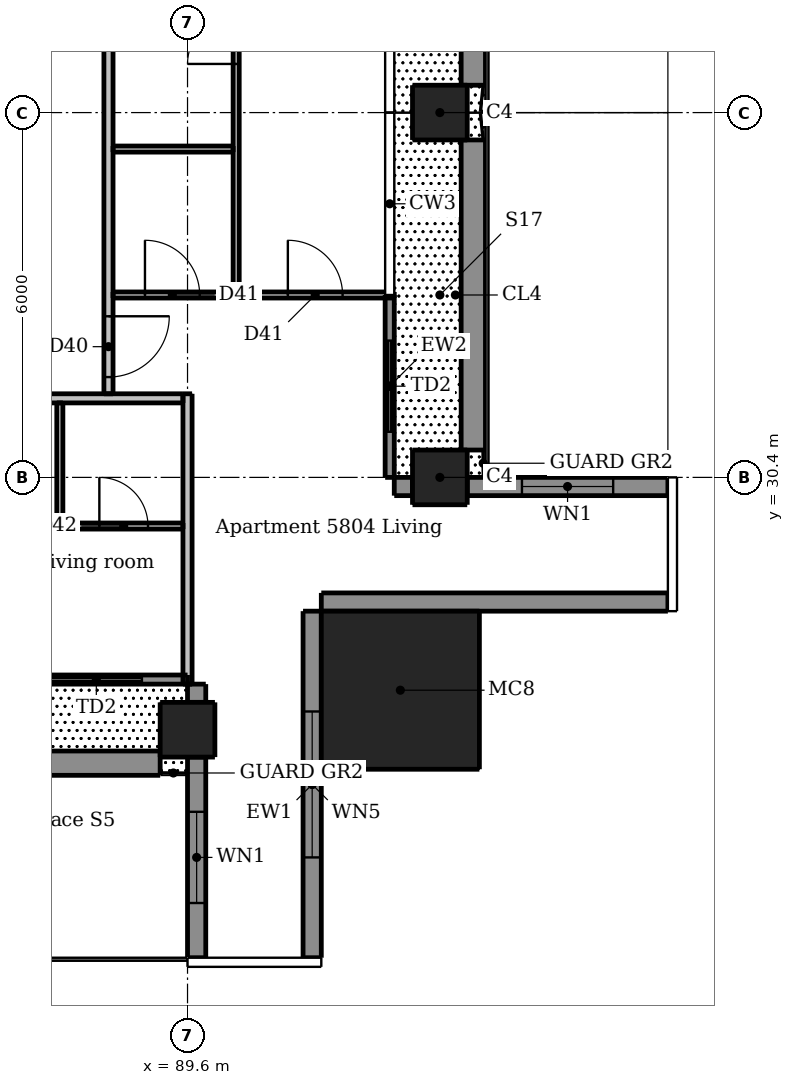
"""IFC4 building model, lengths in metres.
Left out: names, types, materials, properties, quantities, classifications, styles, units other than length and angle.
Written with IfcOpenShell. Run it as: python <this file> out.ifc"""

import sys

from ifc_helpers import new_model, si_unit, direction, frame, frame_2d, origin, origin_2d, place, context, subcontext, project, spatial, rectangle, extrude, element, fill, save


model = new_model("IFC4")
c1 = context("Model", 3, precision=1e-05, world=origin(), true_north=direction((0.0, 1.0)))
c2 = subcontext(c1, "Body", "Model", "MODEL_VIEW")
j1 = project(units=[si_unit("LENGTHUNIT", "METRE"), si_unit("PLANEANGLEUNIT", "RADIAN")], contexts=[c1])
p1 = place(None, origin())
s1 = spatial("IfcSite", under=j1, at=p1, CompositionType="ELEMENT")
p2 = place(p1, origin())
s2 = spatial("IfcBuilding", under=s1, at=p2, CompositionType="ELEMENT")
p3 = place(p2, frame((0.0, 0.0, 216.7)))
s3 = spatial("IfcBuildingStorey", under=s2, at=p3, CompositionType="ELEMENT", Elevation=216.7)
for number, where, z_axis, x_axis in (
    (1, (89.6, 26.25, 0.0), (0.0, 0.0, 1.0), (1.0, 0.0, 0.0)),
    (2, (93.75, 30.4, 0.0), (0.0, 0.0, 1.0), (1.0, 0.0, 0.0)),
):
    element("IfcColumn", number, at=place(p3, frame(where, z_axis=z_axis, x_axis=x_axis)), inside=s3, PredefinedType="COLUMN", context=c2, shape_type="SweptSolid", body=[
        extrude(rectangle(XDim=0.9, YDim=0.9, at=origin_2d()), origin(), (0.0, 0.0, 1.0), 3.05),
    ])
p4 = place(p3, frame((93.75, 36.4, 0.0), z_axis=(0.0, 0.0, 1.0), x_axis=(1.0, 0.0, 0.0)))
e3 = element("IfcColumn", 3, at=p4, inside=s3, PredefinedType="COLUMN", context=c2, shape_type="SweptSolid", body=[
    extrude(rectangle(XDim=0.9, YDim=0.9, at=origin_2d()), origin(), (0.0, 0.0, 1.0), 3.3),
])
p5 = place(p3, frame((93.1, 26.9, 0.0), z_axis=(0.0, 0.0, 1.0), x_axis=(1.0, 0.0, 0.0)))
e4 = element("IfcColumn", 4, at=p5, inside=s3, PredefinedType="COLUMN", context=c2, shape_type="SweptSolid", body=[
    extrude(rectangle(XDim=2.6, YDim=2.6, at=origin_2d()), origin(), (0.0, 0.0, 1.0), 3.3),
])
p6 = place(p3, frame((89.75, 27.0, 0.0), z_axis=(0.0, 0.0, 1.0), x_axis=(0.0, -1.0, 0.0)))
e5 = element("IfcWall", 5, at=p6, inside=s3, PredefinedType="SOLIDWALL", context=c2, shape_type="SweptSolid", body=[
    extrude(rectangle(XDim=0.3, YDim=0.3, at=frame_2d((0.15, 0.0))), origin(), (0.0, 0.0, 1.0), 3.05),
])
p7 = place(p3, frame((89.75, 25.8, 0.0), z_axis=(0.0, 0.0, 1.0), x_axis=(0.0, -1.0, 0.0)))
e6 = element("IfcWall", 6, at=p7, inside=s3, PredefinedType="SOLIDWALL", context=c2, shape_type="SweptSolid", body=[
    extrude(rectangle(XDim=3.3, YDim=0.3, at=frame_2d((1.65, 0.0))), origin(), (0.0, 0.0, 1.0), 3.05),
])
p8 = place(p7, frame((0.9, 0.0, 0.9)))
e7 = element("IfcOpeningElement", 7, at=p8, cuts=e6, PredefinedType="OPENING", context=c2, shape_type="SweptSolid", body=[
    extrude(rectangle(XDim=1.5, YDim=1.5, at=frame_2d((0.75, 0.75))), frame((0.0, 0.16, 0.0), z_axis=(0.0, -1.0, 0.0), x_axis=(1.0, 0.0, 0.0)), (0.0, 0.0, 1.0), 0.32),
])
p9 = place(p3, frame((91.65, 22.5, 0.0), z_axis=(0.0, 0.0, 1.0), x_axis=(0.0, 1.0, 0.0)))
e8 = element("IfcWall", 8, at=p9, inside=s3, PredefinedType="SOLIDWALL", context=c2, shape_type="SweptSolid", body=[
    extrude(rectangle(XDim=5.7, YDim=0.3, at=frame_2d((2.85, 0.0))), origin(), (0.0, 0.0, 1.0), 3.05),
])
p10 = place(p9, frame((1.65, 0.0, 0.15)))
e9 = element("IfcOpeningElement", 9, at=p10, cuts=e8, PredefinedType="OPENING", context=c2, shape_type="SweptSolid", body=[
    extrude(rectangle(XDim=2.4, YDim=2.1, at=frame_2d((1.2, 1.05))), frame((0.0, 0.16, 0.0), z_axis=(0.0, -1.0, 0.0), x_axis=(1.0, 0.0, 0.0)), (0.0, 0.0, 1.0), 0.32),
])
p11 = place(p3, frame((91.8, 28.35, 0.0), z_axis=(0.0, 0.0, 1.0), x_axis=(1.0, 0.0, 0.0)))
e10 = element("IfcWall", 10, at=p11, inside=s3, PredefinedType="SOLIDWALL", context=c2, shape_type="SweptSolid", body=[
    extrude(rectangle(XDim=5.7, YDim=0.3, at=frame_2d((2.85, 0.0))), origin(), (0.0, 0.0, 1.0), 3.05),
])
p12 = place(p3, frame((97.5, 30.25, 0.0), z_axis=(0.0, 0.0, 1.0), x_axis=(-1.0, 0.0, 0.0)))
e11 = element("IfcWall", 11, at=p12, inside=s3, PredefinedType="SOLIDWALL", context=c2, shape_type="SweptSolid", body=[
    extrude(rectangle(XDim=3.3, YDim=0.3, at=frame_2d((1.65, 0.0))), origin(), (0.0, 0.0, 1.0), 3.05),
])
p13 = place(p12, frame((0.9, 0.0, 0.9)))
e12 = element("IfcOpeningElement", 12, at=p13, cuts=e11, PredefinedType="OPENING", context=c2, shape_type="SweptSolid", body=[
    extrude(rectangle(XDim=1.5, YDim=1.5, at=frame_2d((0.75, 0.75))), frame((0.0, 0.16, 0.0), z_axis=(0.0, -1.0, 0.0), x_axis=(1.0, 0.0, 0.0)), (0.0, 0.0, 1.0), 0.32),
])
p14 = place(p3, frame((93.3, 30.25, 0.0), z_axis=(0.0, 0.0, 1.0), x_axis=(-1.0, 0.0, 0.0)))
e13 = element("IfcWall", 13, at=p14, inside=s3, PredefinedType="SOLIDWALL", context=c2, shape_type="SweptSolid", body=[
    extrude(rectangle(XDim=0.3, YDim=0.3, at=frame_2d((0.15, 0.0))), origin(), (0.0, 0.0, 1.0), 3.05),
])
p15 = place(p3, frame((86.6, 27.075, 0.0), z_axis=(0.0, 0.0, 1.0), x_axis=(1.0, 0.0, 0.0)))
e14 = element("IfcWall", 14, at=p15, inside=s3, PredefinedType="SOLIDWALL", context=c2, shape_type="SweptSolid", body=[
    extrude(rectangle(XDim=3.0, YDim=0.15, at=frame_2d((1.5, 0.0))), origin(), (0.0, 0.0, 1.0), 3.05),
])
p16 = place(p15, frame((0.75, 0.0, 0.0)))
e15 = element("IfcOpeningElement", 15, at=p16, cuts=e14, PredefinedType="OPENING", context=c2, shape_type="SweptSolid", body=[
    extrude(rectangle(XDim=1.5, YDim=2.4, at=frame_2d((0.75, 1.2))), frame((0.0, 0.085, 0.0), z_axis=(0.0, -1.0, 0.0), x_axis=(1.0, 0.0, 0.0)), (0.0, 0.0, 1.0), 0.17),
])
p17 = place(p3, frame((92.925, 30.4, 0.0), z_axis=(0.0, 0.0, 1.0), x_axis=(0.0, 1.0, 0.0)))
e16 = element("IfcWall", 16, at=p17, inside=s3, PredefinedType="SOLIDWALL", context=c2, shape_type="SweptSolid", body=[
    extrude(rectangle(XDim=3.0, YDim=0.15, at=frame_2d((1.5, 0.0))), origin(), (0.0, 0.0, 1.0), 3.05),
])
p18 = place(p17, frame((0.75, 0.0, 0.0)))
e17 = element("IfcOpeningElement", 17, at=p18, cuts=e16, PredefinedType="OPENING", context=c2, shape_type="SweptSolid", body=[
    extrude(rectangle(XDim=1.5, YDim=2.4, at=frame_2d((0.75, 1.2))), frame((0.0, 0.085, 0.0), z_axis=(0.0, -1.0, 0.0), x_axis=(1.0, 0.0, 0.0)), (0.0, 0.0, 1.0), 0.17),
])
for number, where, z_axis, x_axis in (
    (18, (84.05, 25.7, 0.03), (0.0, 0.0, 1.0), (1.0, 0.0, 0.0)),
    (19, (94.3, 30.85, 0.03), (0.0, 0.0, 1.0), (0.0, 1.0, 0.0)),
):
    element("IfcWall", number, at=place(p3, frame(where, z_axis=z_axis, x_axis=x_axis)), inside=s3, PredefinedType="PARAPET", context=c2, shape_type="SweptSolid", body=[
        extrude(rectangle(XDim=5.1, YDim=0.4, at=frame_2d((2.55, 0.0))), origin(), (0.0, 0.0, 1.0), 1.1),
    ])
p19 = place(p3, frame((94.3, 36.85, 0.03), z_axis=(0.0, 0.0, 1.0), x_axis=(0.0, 1.0, 0.0)))
e20 = element("IfcWall", 20, at=p19, inside=s3, PredefinedType="PARAPET", context=c2, shape_type="SweptSolid", body=[
    extrude(rectangle(XDim=5.55, YDim=0.4, at=frame_2d((2.775, 0.0))), origin(), (0.0, 0.0, 1.0), 1.1),
])
p20 = place(p3, frame((87.5, 29.55, 0.0), z_axis=(0.0, 0.0, 1.0), x_axis=(0.0, 1.0, 0.0)))
e21 = element("IfcWall", 21, at=p20, inside=s3, PredefinedType="PARTITIONING", context=c2, shape_type="SweptSolid", body=[
    extrude(rectangle(XDim=2.075, YDim=0.1, at=frame_2d((1.038, 0.0))), origin(), (0.0, 0.0, 1.0), 3.05),
])
p21 = place(p3, frame((90.4, 33.45, 0.0), z_axis=(0.0, 0.0, 1.0), x_axis=(0.0, 1.0, 0.0)))
e22 = element("IfcWall", 22, at=p21, inside=s3, PredefinedType="PARTITIONING", context=c2, shape_type="SweptSolid", body=[
    extrude(rectangle(XDim=9.0, YDim=0.1, at=frame_2d((4.5, 0.0))), origin(), (0.0, 0.0, 1.0), 3.05),
])
p22 = place(p21, frame((3.75, 0.0, 0.0)))
e23 = element("IfcOpeningElement", 23, at=p22, cuts=e22, PredefinedType="OPENING", context=c2, shape_type="SweptSolid", body=[
    extrude(rectangle(XDim=0.8, YDim=2.1, at=frame_2d((0.4, 1.05))), frame((0.0, 0.06, 0.0), z_axis=(0.0, -1.0, 0.0), x_axis=(1.0, 0.0, 0.0)), (0.0, 0.0, 1.0), 0.12),
])
p23 = place(p21, frame((7.0, 0.0, 0.0)))
e24 = element("IfcOpeningElement", 24, at=p23, cuts=e22, PredefinedType="OPENING", context=c2, shape_type="SweptSolid", body=[
    extrude(rectangle(XDim=0.9, YDim=2.1, at=frame_2d((0.45, 1.05))), frame((0.0, 0.06, 0.0), z_axis=(0.0, -1.0, 0.0), x_axis=(1.0, 0.0, 0.0)), (0.0, 0.0, 1.0), 0.12),
])
p24 = place(p3, frame((88.375, 35.8, 0.0), z_axis=(0.0, 0.0, 1.0), x_axis=(1.0, 0.0, 0.0)))
e25 = element("IfcWall", 25, at=p24, inside=s3, PredefinedType="PARTITIONING", context=c2, shape_type="SweptSolid", body=[
    extrude(rectangle(XDim=1.975, YDim=0.1, at=frame_2d((0.988, 0.0))), origin(), (0.0, 0.0, 1.0), 3.05),
])
p25 = place(p3, frame((88.375, 33.4, 0.0), z_axis=(0.0, 0.0, 1.0), x_axis=(1.0, 0.0, 0.0)))
e26 = element("IfcWall", 26, at=p25, inside=s3, PredefinedType="PARTITIONING", context=c2, shape_type="SweptSolid", body=[
    extrude(rectangle(XDim=4.625, YDim=0.1, at=frame_2d((2.312, 0.0))), origin(), (0.0, 0.0, 1.0), 3.05),
])
p26 = place(p25, frame((0.525, 0.0, 0.0)))
e27 = element("IfcOpeningElement", 27, at=p26, cuts=e26, PredefinedType="OPENING", context=c2, shape_type="SweptSolid", body=[
    extrude(rectangle(XDim=0.9, YDim=2.1, at=frame_2d((0.45, 1.05))), frame((0.0, 0.06, 0.0), z_axis=(0.0, -1.0, 0.0), x_axis=(1.0, 0.0, 0.0)), (0.0, 0.0, 1.0), 0.12),
])
p27 = place(p25, frame((2.875, 0.0, 0.0)))
e28 = element("IfcOpeningElement", 28, at=p27, cuts=e26, PredefinedType="OPENING", context=c2, shape_type="SweptSolid", body=[
    extrude(rectangle(XDim=0.9, YDim=2.1, at=frame_2d((0.45, 1.05))), frame((0.0, 0.06, 0.0), z_axis=(0.0, -1.0, 0.0), x_axis=(1.0, 0.0, 0.0)), (0.0, 0.0, 1.0), 0.12),
])
p28 = place(p3, frame((87.55, 29.6, 0.0), z_axis=(0.0, 0.0, 1.0), x_axis=(1.0, 0.0, 0.0)))
e29 = element("IfcWall", 29, at=p28, inside=s3, PredefinedType="PARTITIONING", context=c2, shape_type="SweptSolid", body=[
    extrude(rectangle(XDim=1.975, YDim=0.1, at=frame_2d((0.987, 0.0))), origin(), (0.0, 0.0, 1.0), 3.05),
])
p29 = place(p28, frame((0.6, 0.0, 0.0)))
e30 = element("IfcOpeningElement", 30, at=p29, cuts=e29, PredefinedType="OPENING", context=c2, shape_type="SweptSolid", body=[
    extrude(rectangle(XDim=0.8, YDim=2.1, at=frame_2d((0.4, 1.05))), frame((0.0, 0.06, 0.0), z_axis=(0.0, -1.0, 0.0), x_axis=(1.0, 0.0, 0.0)), (0.0, 0.0, 1.0), 0.12),
])
p30 = place(p3, frame((88.3, 61.175, 0.0), z_axis=(0.0, 0.0, 1.0), x_axis=(0.0, -1.0, 0.0)))
e31 = element("IfcWall", 31, at=p30, inside=s3, PredefinedType="PARTITIONING", context=c2, shape_type="SweptSolid", body=[
    extrude(rectangle(XDim=29.4, YDim=0.15, at=frame_2d((14.7, 0.0))), origin(), (0.0, 0.0, 1.0), 3.05),
])
p31 = place(p30, frame((28.125, 0.0, 0.0)))
e32 = element("IfcOpeningElement", 32, at=p31, cuts=e31, PredefinedType="OPENING", context=c2, shape_type="SweptSolid", body=[
    extrude(rectangle(XDim=1.0, YDim=2.1, at=frame_2d((0.5, 1.05))), frame((0.0, 0.085, 0.0), z_axis=(0.0, -1.0, 0.0), x_axis=(1.0, 0.0, 0.0)), (0.0, 0.0, 1.0), 0.17),
])
p32 = place(p30, frame((15.275, 0.0, 0.0)))
e33 = element("IfcOpeningElement", 33, at=p32, cuts=e31, PredefinedType="OPENING", context=c2, shape_type="SweptSolid", body=[
    extrude(rectangle(XDim=1.0, YDim=2.1, at=frame_2d((0.5, 1.05))), frame((0.0, 0.085, 0.0), z_axis=(0.0, -1.0, 0.0), x_axis=(1.0, 0.0, 0.0)), (0.0, 0.0, 1.0), 0.17),
])
p33 = place(p30, frame((5.075, 0.0, 0.0)))
e34 = element("IfcOpeningElement", 34, at=p33, cuts=e31, PredefinedType="OPENING", context=c2, shape_type="SweptSolid", body=[
    extrude(rectangle(XDim=1.0, YDim=2.1, at=frame_2d((0.5, 1.05))), frame((0.0, 0.085, 0.0), z_axis=(0.0, -1.0, 0.0), x_axis=(1.0, 0.0, 0.0)), (0.0, 0.0, 1.0), 0.17),
])
p34 = place(p3, frame((89.6, 27.0, 0.0), z_axis=(0.0, 0.0, 1.0), x_axis=(0.0, 1.0, 0.0)))
e35 = element("IfcWall", 35, at=p34, inside=s3, PredefinedType="PARTITIONING", context=c2, shape_type="SweptSolid", body=[
    extrude(rectangle(XDim=4.775, YDim=0.15, at=frame_2d((2.387, 0.0))), origin(), (0.0, 0.0, 1.0), 2.516),
])
p35 = place(p3, frame((89.525, 31.7, 0.0), z_axis=(0.0, 0.0, 1.0), x_axis=(-1.0, 0.0, 0.0)))
e36 = element("IfcWall", 36, at=p35, inside=s3, PredefinedType="PARTITIONING", context=c2, shape_type="SweptSolid", body=[
    extrude(rectangle(XDim=30.55, YDim=0.15, at=frame_2d((15.275, 0.0))), origin(), (0.0, 0.0, 1.0), 3.05),
])
p36 = place(p35, frame((28.275, 0.0, 0.0)))
e37 = element("IfcOpeningElement", 37, at=p36, cuts=e36, PredefinedType="OPENING", context=c2, shape_type="SweptSolid", body=[
    extrude(rectangle(XDim=1.0, YDim=2.1, at=frame_2d((0.5, 1.05))), frame((0.0, 0.085, 0.0), z_axis=(0.0, -1.0, 0.0), x_axis=(1.0, 0.0, 0.0)), (0.0, 0.0, 1.0), 0.17),
])
p37 = place(p35, frame((12.625, 0.0, 0.0)))
e38 = element("IfcOpeningElement", 38, at=p37, cuts=e36, PredefinedType="OPENING", context=c2, shape_type="SweptSolid", body=[
    extrude(rectangle(XDim=1.0, YDim=2.1, at=frame_2d((0.5, 1.05))), frame((0.0, 0.085, 0.0), z_axis=(0.0, -1.0, 0.0), x_axis=(1.0, 0.0, 0.0)), (0.0, 0.0, 1.0), 0.17),
])
p38 = place(p35, frame((2.425, 0.0, 0.0)))
e39 = element("IfcOpeningElement", 39, at=p38, cuts=e36, PredefinedType="OPENING", context=c2, shape_type="SweptSolid", body=[
    extrude(rectangle(XDim=1.0, YDim=2.1, at=frame_2d((0.5, 1.05))), frame((0.0, 0.085, 0.0), z_axis=(0.0, -1.0, 0.0), x_axis=(1.0, 0.0, 0.0)), (0.0, 0.0, 1.0), 0.17),
])
p39 = place(p8, origin())
e40 = element("IfcWindow", 40, at=p39, inside=s3, PartitioningType="DOUBLE_PANEL_VERTICAL", PredefinedType="WINDOW", context=c2, shape_type="SweptSolid", body=[
    extrude(rectangle(XDim=1.5, YDim=1.5, at=frame_2d((0.75, 0.75))), frame((0.0, 0.03, 0.0), z_axis=(0.0, -1.0, 0.0), x_axis=(1.0, 0.0, 0.0)), (0.0, 0.0, 1.0), 0.06),
])
fill(e7, e40)
p40 = place(p10, origin())
e41 = element("IfcWindow", 41, at=p40, inside=s3, PartitioningType="DOUBLE_PANEL_VERTICAL", PredefinedType="WINDOW", context=c2, shape_type="SweptSolid", body=[
    extrude(rectangle(XDim=2.4, YDim=2.1, at=frame_2d((1.2, 1.05))), frame((0.0, 0.03, 0.0), z_axis=(0.0, -1.0, 0.0), x_axis=(1.0, 0.0, 0.0)), (0.0, 0.0, 1.0), 0.06),
])
fill(e9, e41)
p41 = place(p13, origin())
e42 = element("IfcWindow", 42, at=p41, inside=s3, PartitioningType="DOUBLE_PANEL_VERTICAL", PredefinedType="WINDOW", context=c2, shape_type="SweptSolid", body=[
    extrude(rectangle(XDim=1.5, YDim=1.5, at=frame_2d((0.75, 0.75))), frame((0.0, 0.03, 0.0), z_axis=(0.0, -1.0, 0.0), x_axis=(1.0, 0.0, 0.0)), (0.0, 0.0, 1.0), 0.06),
])
fill(e12, e42)
p42 = place(p16, origin())
e43 = element("IfcDoor", 43, at=p42, inside=s3, OperationType="DOUBLE_DOOR_SLIDING", PredefinedType="DOOR", context=c2, shape_type="SweptSolid", body=[
    extrude(rectangle(XDim=1.5, YDim=2.4, at=frame_2d((0.75, 1.2))), frame((0.0, 0.025, 0.0), z_axis=(0.0, -1.0, 0.0), x_axis=(1.0, 0.0, 0.0)), (0.0, 0.0, 1.0), 0.05),
])
fill(e15, e43)
p43 = place(p18, origin())
e44 = element("IfcDoor", 44, at=p43, inside=s3, OperationType="DOUBLE_DOOR_SLIDING", PredefinedType="DOOR", context=c2, shape_type="SweptSolid", body=[
    extrude(rectangle(XDim=1.5, YDim=2.4, at=frame_2d((0.75, 1.2))), frame((0.0, 0.025, 0.0), z_axis=(0.0, -1.0, 0.0), x_axis=(1.0, 0.0, 0.0)), (0.0, 0.0, 1.0), 0.05),
])
fill(e17, e44)
p44 = place(p29, origin())
e45 = element("IfcDoor", 45, at=p44, inside=s3, OperationType="SINGLE_SWING_LEFT", PredefinedType="DOOR", context=c2, shape_type="SweptSolid", body=[
    extrude(rectangle(XDim=0.8, YDim=2.1, at=frame_2d((0.4, 1.05))), frame((0.0, 0.025, 0.0), z_axis=(0.0, -1.0, 0.0), x_axis=(1.0, 0.0, 0.0)), (0.0, 0.0, 1.0), 0.05),
])
fill(e30, e45)
p45 = place(p31, origin())
e46 = element("IfcDoor", 46, at=p45, inside=s3, OperationType="SINGLE_SWING_LEFT", PredefinedType="DOOR", context=c2, shape_type="SweptSolid", body=[
    extrude(rectangle(XDim=1.0, YDim=2.1, at=frame_2d((0.5, 1.05))), frame((0.0, 0.025, 0.0), z_axis=(0.0, -1.0, 0.0), x_axis=(1.0, 0.0, 0.0)), (0.0, 0.0, 1.0), 0.05),
])
fill(e32, e46)
p46 = place(p26, origin())
e47 = element("IfcDoor", 47, at=p46, inside=s3, OperationType="SINGLE_SWING_LEFT", PredefinedType="DOOR", context=c2, shape_type="SweptSolid", body=[
    extrude(rectangle(XDim=0.9, YDim=2.1, at=frame_2d((0.45, 1.05))), frame((0.0, 0.025, 0.0), z_axis=(0.0, -1.0, 0.0), x_axis=(1.0, 0.0, 0.0)), (0.0, 0.0, 1.0), 0.05),
])
fill(e27, e47)
p47 = place(p27, origin())
e48 = element("IfcDoor", 48, at=p47, inside=s3, OperationType="SINGLE_SWING_LEFT", PredefinedType="DOOR", context=c2, shape_type="SweptSolid", body=[
    extrude(rectangle(XDim=0.9, YDim=2.1, at=frame_2d((0.45, 1.05))), frame((0.0, 0.025, 0.0), z_axis=(0.0, -1.0, 0.0), x_axis=(1.0, 0.0, 0.0)), (0.0, 0.0, 1.0), 0.05),
])
fill(e28, e48)
p48 = place(p22, origin())
e49 = element("IfcDoor", 49, at=p48, inside=s3, OperationType="SINGLE_SWING_LEFT", PredefinedType="DOOR", context=c2, shape_type="SweptSolid", body=[
    extrude(rectangle(XDim=0.8, YDim=2.1, at=frame_2d((0.4, 1.05))), frame((0.0, 0.025, 0.0), z_axis=(0.0, -1.0, 0.0), x_axis=(1.0, 0.0, 0.0)), (0.0, 0.0, 1.0), 0.05),
])
fill(e23, e49)
save(model, sys.argv[1])
